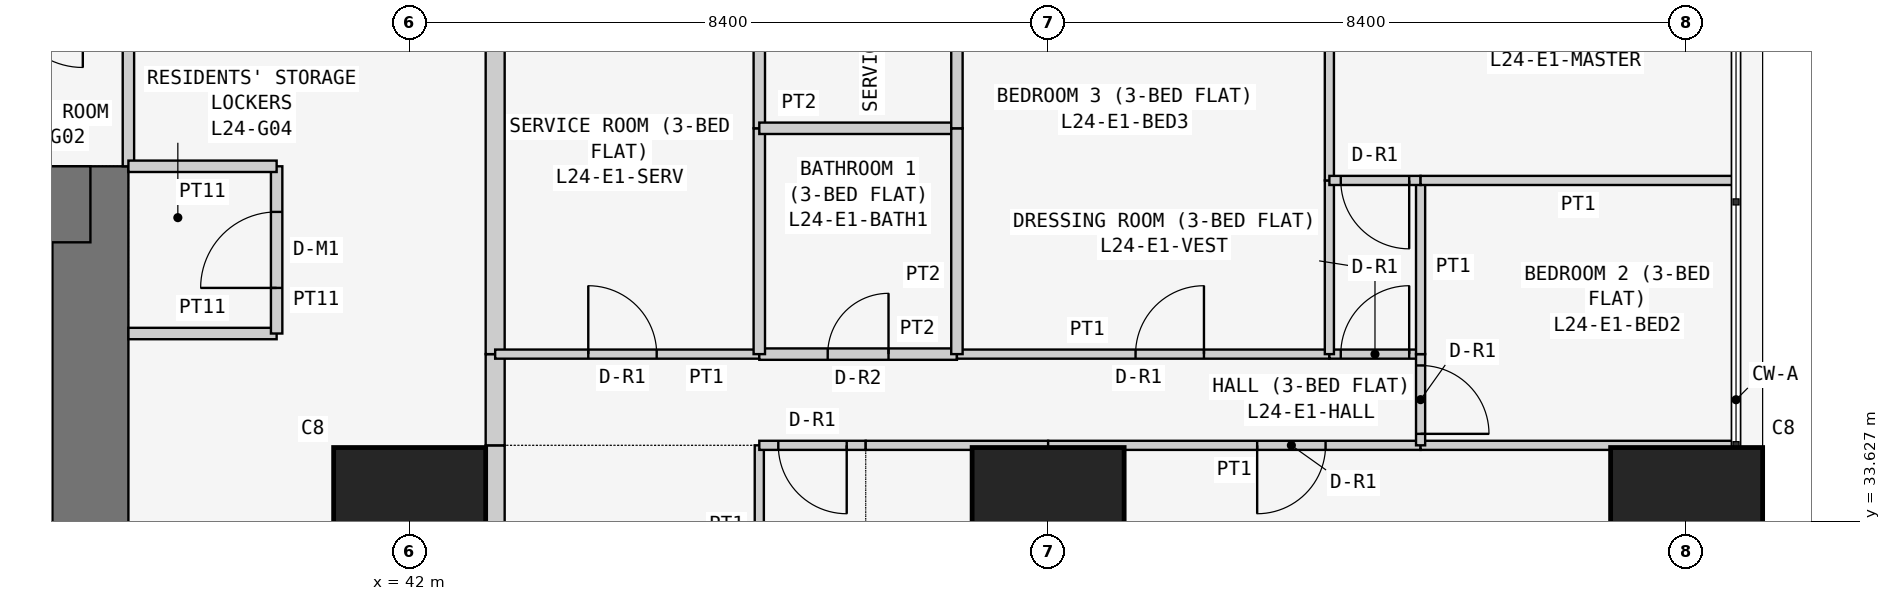
"""IFC4 building model, lengths in metres.
Left out: names, types, materials, properties, quantities, classifications, styles, units other than length and angle.
Written with IfcOpenShell. Run it as: python <this file> out.ifc"""

import sys

from ifc_helpers import new_model, si_unit, direction, frame, frame_2d, origin, origin_2d, place, context, subcontext, project, spatial, rectangle, extrude, element, fill, save


model = new_model("IFC4")
c1 = context("Model", 3, precision=1e-05, world=origin(), true_north=direction((0.0, 1.0)))
c2 = subcontext(c1, "Body", "Model", "MODEL_VIEW")
j1 = project(units=[si_unit("LENGTHUNIT", "METRE"), si_unit("PLANEANGLEUNIT", "RADIAN")], contexts=[c1])
p1 = place(None, origin())
s1 = spatial("IfcSite", under=j1, at=p1, CompositionType="ELEMENT")
p2 = place(p1, origin())
s2 = spatial("IfcBuilding", under=s1, at=p2, CompositionType="ELEMENT")
p3 = place(p2, frame((0.0, 0.0, 95.7)))
s3 = spatial("IfcBuildingStorey", under=s2, at=p3, CompositionType="ELEMENT", Elevation=95.7)
for number, where, z_axis, x_axis in (
    (1, (42.0, 33.6, 0.0), (0.0, 0.0, 1.0), (1.0, 0.0, 0.0)),
    (2, (50.4, 33.6, 0.0), (0.0, 0.0, 1.0), (1.0, 0.0, 0.0)),
    (3, (58.8, 33.6, 0.0), (0.0, 0.0, 1.0), (1.0, 0.0, 0.0)),
):
    element("IfcColumn", number, at=place(p3, frame(where, z_axis=z_axis, x_axis=x_axis)), inside=s3, PredefinedType="COLUMN", context=c2, shape_type="SweptSolid", body=[
        extrude(rectangle(XDim=2.0, YDim=2.0, at=origin_2d()), origin(), (0.0, 0.0, 1.0), 3.6),
    ])
p4 = place(p3, frame((37.8, 21.0, 0.0), z_axis=(0.0, 0.0, 1.0), x_axis=(0.0, 1.0, 0.0)))
e4 = element("IfcWall", 4, at=p4, inside=s3, PredefinedType="SHEAR", context=c2, shape_type="SweptSolid", body=[
    extrude(rectangle(XDim=17.3, YDim=1.0, at=frame_2d((8.65, 0.0))), origin(), (0.0, 0.0, 1.0), 3.6),
])
p5 = place(p4, frame((5.2, 0.0, 0.0)))
e5 = element("IfcOpeningElement", 5, at=p5, cuts=e4, PredefinedType="OPENING", context=c2, shape_type="SweptSolid", body=[
    extrude(rectangle(XDim=1.2, YDim=2.1, at=frame_2d((0.6, 1.05))), frame((0.0, 0.51, 0.0), z_axis=(0.0, -1.0, 0.0), x_axis=(1.0, 0.0, 0.0)), (0.0, 0.0, 1.0), 1.02),
])
p6 = place(p3, frame((37.8, 37.8, 0.0), z_axis=(0.0, 0.0, 1.0), x_axis=(-1.0, 0.0, 0.0)))
e6 = element("IfcWall", 6, at=p6, inside=s3, PredefinedType="SHEAR", context=c2, shape_type="SweptSolid", body=[
    extrude(rectangle(XDim=17.3, YDim=1.0, at=frame_2d((8.65, 0.0))), origin(), (0.0, 0.0, 1.0), 3.6),
])
p7 = place(p3, frame((38.3, 38.3, 0.0), z_axis=(0.0, 0.0, 1.0), x_axis=(0.0, 1.0, 0.0)))
e7 = element("IfcWall", 7, at=p7, inside=s3, PredefinedType="PARTITIONING", context=c2, shape_type="SweptSolid", body=[
    extrude(rectangle(XDim=2.3, YDim=0.15, at=frame_2d((1.15, 0.0))), origin(), (0.0, 0.0, 1.0), 3.45),
])
p8 = place(p3, frame((38.3, 36.1, 0.0), z_axis=(0.0, 0.0, 1.0), x_axis=(1.0, 0.0, 0.0)))
e8 = element("IfcWall", 8, at=p8, inside=s3, PredefinedType="PARTITIONING", context=c2, shape_type="SweptSolid", body=[
    extrude(rectangle(XDim=1.95, YDim=0.15, at=frame_2d((0.975, 0.0))), origin(), (0.0, 0.0, 1.0), 3.45),
])
p9 = place(p3, frame((40.25, 36.1, 0.0), z_axis=(0.0, 0.0, 1.0), x_axis=(0.0, 1.0, 0.0)))
e9 = element("IfcWall", 9, at=p9, inside=s3, PredefinedType="PARTITIONING", context=c2, shape_type="SweptSolid", body=[
    extrude(rectangle(XDim=2.2, YDim=0.15, at=frame_2d((1.1, 0.0))), origin(), (0.0, 0.0, 1.0), 3.45),
])
p10 = place(p9, frame((0.6, 0.0, 0.0)))
e10 = element("IfcOpeningElement", 10, at=p10, cuts=e9, PredefinedType="OPENING", context=c2, shape_type="SweptSolid", body=[
    extrude(rectangle(XDim=1.0, YDim=2.1, at=frame_2d((0.5, 1.05))), frame((0.0, 0.085, 0.0), z_axis=(0.0, -1.0, 0.0), x_axis=(1.0, 0.0, 0.0)), (0.0, 0.0, 1.0), 0.17),
])
p11 = place(p3, frame((40.25, 38.3, 0.0), z_axis=(0.0, 0.0, 1.0), x_axis=(-1.0, 0.0, 0.0)))
e11 = element("IfcWall", 11, at=p11, inside=s3, PredefinedType="PARTITIONING", context=c2, shape_type="SweptSolid", body=[
    extrude(rectangle(XDim=1.95, YDim=0.15, at=frame_2d((0.975, 0.0))), origin(), (0.0, 0.0, 1.0), 3.45),
])
p12 = place(p3, frame((43.125, 34.629, 0.0), z_axis=(0.0, 0.0, 1.0), x_axis=(0.0, -1.0, 0.0)))
e12 = element("IfcWall", 12, at=p12, inside=s3, PredefinedType="PARTITIONING", context=c2, shape_type="SweptSolid", body=[
    extrude(rectangle(XDim=5.229, YDim=0.25, at=frame_2d((2.615, 0.0))), origin(), (0.0, 0.0, 1.0), 3.45),
])
p13 = place(p12, frame((2.229, 0.0, 0.0)))
e13 = element("IfcOpeningElement", 13, at=p13, cuts=e12, PredefinedType="OPENING", context=c2, shape_type="SweptSolid", body=[
    extrude(rectangle(XDim=1.0, YDim=2.1, at=frame_2d((0.5, 1.05))), frame((0.0, 0.135, 0.0), z_axis=(0.0, -1.0, 0.0), x_axis=(1.0, 0.0, 0.0)), (0.0, 0.0, 1.0), 0.27),
])
p14 = place(p3, frame((43.125, 35.829, 0.0), z_axis=(0.0, 0.0, 1.0), x_axis=(0.0, -1.0, 0.0)))
e14 = element("IfcWall", 14, at=p14, inside=s3, PredefinedType="PARTITIONING", context=c2, shape_type="SweptSolid", body=[
    extrude(rectangle(XDim=1.2, YDim=0.25, at=frame_2d((0.6, 0.0))), origin(), (0.0, 0.0, 1.0), 3.45),
])
p15 = place(p3, frame((43.125, 42.7, 0.0), z_axis=(0.0, 0.0, 1.0), x_axis=(0.0, -1.0, 0.0)))
e15 = element("IfcWall", 15, at=p15, inside=s3, PredefinedType="PARTITIONING", context=c2, shape_type="SweptSolid", body=[
    extrude(rectangle(XDim=6.871, YDim=0.25, at=frame_2d((3.436, 0.0))), origin(), (0.0, 0.0, 1.0), 3.45),
])
p16 = place(p3, frame((46.6, 29.4, 0.0), z_axis=(0.0, 0.0, 1.0), x_axis=(0.0, 1.0, 0.0)))
e16 = element("IfcWall", 16, at=p16, inside=s3, PredefinedType="PARTITIONING", context=c2, shape_type="SweptSolid", body=[
    extrude(rectangle(XDim=5.229, YDim=0.12, at=frame_2d((2.615, 0.0))), origin(), (0.0, 0.0, 1.0), 3.45),
])
p17 = place(p3, frame((48.0, 34.629, 0.0), z_axis=(0.0, 0.0, 1.0), x_axis=(-1.0, 0.0, 0.0)))
e17 = element("IfcWall", 17, at=p17, inside=s3, PredefinedType="PARTITIONING", context=c2, shape_type="SweptSolid", body=[
    extrude(rectangle(XDim=1.4, YDim=0.12, at=frame_2d((0.7, 0.0))), origin(), (0.0, 0.0, 1.0), 3.45),
])
p18 = place(p17, frame((0.25, 0.0, 0.0)))
e18 = element("IfcOpeningElement", 18, at=p18, cuts=e17, PredefinedType="OPENING", context=c2, shape_type="SweptSolid", body=[
    extrude(rectangle(XDim=0.9, YDim=2.1, at=frame_2d((0.45, 1.05))), frame((0.0, 0.07, 0.0), z_axis=(0.0, -1.0, 0.0), x_axis=(1.0, 0.0, 0.0)), (0.0, 0.0, 1.0), 0.14),
])
p19 = place(p3, frame((50.4, 34.629, 0.0), z_axis=(0.0, 0.0, 1.0), x_axis=(-1.0, 0.0, 0.0)))
e19 = element("IfcWall", 19, at=p19, inside=s3, PredefinedType="PARTITIONING", context=c2, shape_type="SweptSolid", body=[
    extrude(rectangle(XDim=2.4, YDim=0.12, at=frame_2d((1.2, 0.0))), origin(), (0.0, 0.0, 1.0), 3.45),
])
p20 = place(p3, frame((55.3, 34.629, 0.0), z_axis=(0.0, 0.0, 1.0), x_axis=(-1.0, 0.0, 0.0)))
e20 = element("IfcWall", 20, at=p20, inside=s3, PredefinedType="PARTITIONING", context=c2, shape_type="SweptSolid", body=[
    extrude(rectangle(XDim=4.9, YDim=0.12, at=frame_2d((2.45, 0.0))), origin(), (0.0, 0.0, 1.0), 3.45),
])
p21 = place(p20, frame((1.25, 0.0, 0.0)))
e21 = element("IfcOpeningElement", 21, at=p21, cuts=e20, PredefinedType="OPENING", context=c2, shape_type="SweptSolid", body=[
    extrude(rectangle(XDim=0.9, YDim=2.1, at=frame_2d((0.45, 1.05))), frame((0.0, 0.07, 0.0), z_axis=(0.0, -1.0, 0.0), x_axis=(1.0, 0.0, 0.0)), (0.0, 0.0, 1.0), 0.14),
])
p22 = place(p3, frame((59.45, 34.629, 0.0), z_axis=(0.0, 0.0, 1.0), x_axis=(-1.0, 0.0, 0.0)))
e22 = element("IfcWall", 22, at=p22, inside=s3, PredefinedType="PARTITIONING", context=c2, shape_type="SweptSolid", body=[
    extrude(rectangle(XDim=4.15, YDim=0.12, at=frame_2d((2.075, 0.0))), origin(), (0.0, 0.0, 1.0), 3.45),
])
p23 = place(p3, frame((46.6, 35.829, 0.0), z_axis=(0.0, 0.0, 1.0), x_axis=(-1.0, 0.0, 0.0)))
e23 = element("IfcWall", 23, at=p23, inside=s3, PredefinedType="PARTITIONING", context=c2, shape_type="SweptSolid", body=[
    extrude(rectangle(XDim=3.475, YDim=0.12, at=frame_2d((1.738, 0.0))), origin(), (0.0, 0.0, 1.0), 3.45),
])
p24 = place(p23, frame((1.35, 0.0, 0.0)))
e24 = element("IfcOpeningElement", 24, at=p24, cuts=e23, PredefinedType="OPENING", context=c2, shape_type="SweptSolid", body=[
    extrude(rectangle(XDim=0.9, YDim=2.1, at=frame_2d((0.45, 1.05))), frame((0.0, 0.07, 0.0), z_axis=(0.0, -1.0, 0.0), x_axis=(1.0, 0.0, 0.0)), (0.0, 0.0, 1.0), 0.14),
])
p25 = place(p3, frame((49.2, 35.829, 0.0), z_axis=(0.0, 0.0, 1.0), x_axis=(-1.0, 0.0, 0.0)))
e25 = element("IfcWall", 25, at=p25, inside=s3, PredefinedType="PARTITIONING", context=c2, shape_type="SweptSolid", body=[
    extrude(rectangle(XDim=2.6, YDim=0.15, at=frame_2d((1.3, 0.0))), origin(), (0.0, 0.0, 1.0), 3.45),
])
p26 = place(p25, frame((0.9, 0.0, 0.0)))
e26 = element("IfcOpeningElement", 26, at=p26, cuts=e25, PredefinedType="OPENING", context=c2, shape_type="SweptSolid", body=[
    extrude(rectangle(XDim=0.8, YDim=2.1, at=frame_2d((0.4, 1.05))), frame((0.0, 0.085, 0.0), z_axis=(0.0, -1.0, 0.0), x_axis=(1.0, 0.0, 0.0)), (0.0, 0.0, 1.0), 0.17),
])
p27 = place(p3, frame((54.1, 35.829, 0.0), z_axis=(0.0, 0.0, 1.0), x_axis=(-1.0, 0.0, 0.0)))
e27 = element("IfcWall", 27, at=p27, inside=s3, PredefinedType="PARTITIONING", context=c2, shape_type="SweptSolid", body=[
    extrude(rectangle(XDim=4.9, YDim=0.12, at=frame_2d((2.45, 0.0))), origin(), (0.0, 0.0, 1.0), 3.45),
])
p28 = place(p27, frame((1.65, 0.0, 0.0)))
e28 = element("IfcOpeningElement", 28, at=p28, cuts=e27, PredefinedType="OPENING", context=c2, shape_type="SweptSolid", body=[
    extrude(rectangle(XDim=0.9, YDim=2.1, at=frame_2d((0.45, 1.05))), frame((0.0, 0.07, 0.0), z_axis=(0.0, -1.0, 0.0), x_axis=(1.0, 0.0, 0.0)), (0.0, 0.0, 1.0), 0.14),
])
p29 = place(p3, frame((55.3, 35.829, 0.0), z_axis=(0.0, 0.0, 1.0), x_axis=(-1.0, 0.0, 0.0)))
e29 = element("IfcWall", 29, at=p29, inside=s3, PredefinedType="PARTITIONING", context=c2, shape_type="SweptSolid", body=[
    extrude(rectangle(XDim=1.2, YDim=0.12, at=frame_2d((0.6, 0.0))), origin(), (0.0, 0.0, 1.0), 3.45),
])
p30 = place(p29, frame((0.15, 0.0, 0.0)))
e30 = element("IfcOpeningElement", 30, at=p30, cuts=e29, PredefinedType="OPENING", context=c2, shape_type="SweptSolid", body=[
    extrude(rectangle(XDim=0.9, YDim=2.1, at=frame_2d((0.45, 1.05))), frame((0.0, 0.07, 0.0), z_axis=(0.0, -1.0, 0.0), x_axis=(1.0, 0.0, 0.0)), (0.0, 0.0, 1.0), 0.14),
])
p31 = place(p3, frame((55.3, 34.629, 0.0), z_axis=(0.0, 0.0, 1.0), x_axis=(0.0, 1.0, 0.0)))
e31 = element("IfcWall", 31, at=p31, inside=s3, PredefinedType="PARTITIONING", context=c2, shape_type="SweptSolid", body=[
    extrude(rectangle(XDim=1.2, YDim=0.12, at=frame_2d((0.6, 0.0))), origin(), (0.0, 0.0, 1.0), 3.45),
])
p32 = place(p31, frame((0.151, 0.0, 0.0)))
e32 = element("IfcOpeningElement", 32, at=p32, cuts=e31, PredefinedType="OPENING", context=c2, shape_type="SweptSolid", body=[
    extrude(rectangle(XDim=0.9, YDim=2.1, at=frame_2d((0.45, 1.05))), frame((0.0, 0.07, 0.0), z_axis=(0.0, -1.0, 0.0), x_axis=(1.0, 0.0, 0.0)), (0.0, 0.0, 1.0), 0.14),
])
p33 = place(p3, frame((46.6, 35.829, 0.0), z_axis=(0.0, 0.0, 1.0), x_axis=(0.0, 1.0, 0.0)))
e33 = element("IfcWall", 33, at=p33, inside=s3, PredefinedType="PARTITIONING", context=c2, shape_type="SweptSolid", body=[
    extrude(rectangle(XDim=2.971, YDim=0.15, at=frame_2d((1.485, 0.0))), origin(), (0.0, 0.0, 1.0), 3.45),
])
p34 = place(p3, frame((46.6, 38.8, 0.0), z_axis=(0.0, 0.0, 1.0), x_axis=(0.0, 1.0, 0.0)))
e34 = element("IfcWall", 34, at=p34, inside=s3, PredefinedType="PARTITIONING", context=c2, shape_type="SweptSolid", body=[
    extrude(rectangle(XDim=3.9, YDim=0.15, at=frame_2d((1.95, 0.0))), origin(), (0.0, 0.0, 1.0), 3.45),
])
p35 = place(p34, frame((1.25, 0.0, 0.0)))
e35 = element("IfcOpeningElement", 35, at=p35, cuts=e34, PredefinedType="OPENING", context=c2, shape_type="SweptSolid", body=[
    extrude(rectangle(XDim=0.8, YDim=2.1, at=frame_2d((0.4, 1.05))), frame((0.0, 0.085, 0.0), z_axis=(0.0, -1.0, 0.0), x_axis=(1.0, 0.0, 0.0)), (0.0, 0.0, 1.0), 0.17),
])
p36 = place(p3, frame((49.2, 38.8, 0.0), z_axis=(0.0, 0.0, 1.0), x_axis=(-1.0, 0.0, 0.0)))
e36 = element("IfcWall", 36, at=p36, inside=s3, PredefinedType="PARTITIONING", context=c2, shape_type="SweptSolid", body=[
    extrude(rectangle(XDim=2.6, YDim=0.15, at=frame_2d((1.3, 0.0))), origin(), (0.0, 0.0, 1.0), 3.45),
])
p37 = place(p3, frame((49.2, 35.829, 0.0), z_axis=(0.0, 0.0, 1.0), x_axis=(0.0, 1.0, 0.0)))
e37 = element("IfcWall", 37, at=p37, inside=s3, PredefinedType="PARTITIONING", context=c2, shape_type="SweptSolid", body=[
    extrude(rectangle(XDim=2.971, YDim=0.15, at=frame_2d((1.485, 0.0))), origin(), (0.0, 0.0, 1.0), 3.45),
])
p38 = place(p3, frame((49.2, 38.8, 0.0), z_axis=(0.0, 0.0, 1.0), x_axis=(0.0, 1.0, 0.0)))
e38 = element("IfcWall", 38, at=p38, inside=s3, PredefinedType="PARTITIONING", context=c2, shape_type="SweptSolid", body=[
    extrude(rectangle(XDim=3.9, YDim=0.15, at=frame_2d((1.95, 0.0))), origin(), (0.0, 0.0, 1.0), 3.45),
])
p39 = place(p3, frame((54.1, 35.829, 0.0), z_axis=(0.0, 0.0, 1.0), x_axis=(0.0, 1.0, 0.0)))
e39 = element("IfcWall", 39, at=p39, inside=s3, PredefinedType="PARTITIONING", context=c2, shape_type="SweptSolid", body=[
    extrude(rectangle(XDim=2.285, YDim=0.12, at=frame_2d((1.143, 0.0))), origin(), (0.0, 0.0, 1.0), 3.45),
])
p40 = place(p3, frame((54.1, 38.114, 0.0), z_axis=(0.0, 0.0, 1.0), x_axis=(0.0, 1.0, 0.0)))
e40 = element("IfcWall", 40, at=p40, inside=s3, PredefinedType="PARTITIONING", context=c2, shape_type="SweptSolid", body=[
    extrude(rectangle(XDim=4.586, YDim=0.12, at=frame_2d((2.293, 0.0))), origin(), (0.0, 0.0, 1.0), 3.45),
])
p41 = place(p3, frame((55.3, 35.829, 0.0), z_axis=(0.0, 0.0, 1.0), x_axis=(0.0, 1.0, 0.0)))
e41 = element("IfcWall", 41, at=p41, inside=s3, PredefinedType="PARTITIONING", context=c2, shape_type="SweptSolid", body=[
    extrude(rectangle(XDim=2.285, YDim=0.12, at=frame_2d((1.143, 0.0))), origin(), (0.0, 0.0, 1.0), 3.45),
])
p42 = place(p3, frame((55.3, 38.114, 0.0), z_axis=(0.0, 0.0, 1.0), x_axis=(-1.0, 0.0, 0.0)))
e42 = element("IfcWall", 42, at=p42, inside=s3, PredefinedType="PARTITIONING", context=c2, shape_type="SweptSolid", body=[
    extrude(rectangle(XDim=1.2, YDim=0.12, at=frame_2d((0.6, 0.0))), origin(), (0.0, 0.0, 1.0), 3.45),
])
p43 = place(p42, frame((0.15, 0.0, 0.0)))
e43 = element("IfcOpeningElement", 43, at=p43, cuts=e42, PredefinedType="OPENING", context=c2, shape_type="SweptSolid", body=[
    extrude(rectangle(XDim=0.9, YDim=2.1, at=frame_2d((0.45, 1.05))), frame((0.0, 0.07, 0.0), z_axis=(0.0, -1.0, 0.0), x_axis=(1.0, 0.0, 0.0)), (0.0, 0.0, 1.0), 0.14),
])
p44 = place(p3, frame((59.45, 38.114, 0.0), z_axis=(0.0, 0.0, 1.0), x_axis=(-1.0, 0.0, 0.0)))
e44 = element("IfcWall", 44, at=p44, inside=s3, PredefinedType="PARTITIONING", context=c2, shape_type="SweptSolid", body=[
    extrude(rectangle(XDim=4.15, YDim=0.12, at=frame_2d((2.075, 0.0))), origin(), (0.0, 0.0, 1.0), 3.45),
])
p45 = place(p10, origin())
e45 = element("IfcDoor", 45, at=p45, inside=s3, OperationType="SINGLE_SWING_LEFT", PredefinedType="DOOR", context=c2, shape_type="SweptSolid", body=[
    extrude(rectangle(XDim=1.0, YDim=2.1, at=frame_2d((0.5, 1.05))), frame((0.0, 0.025, 0.0), z_axis=(0.0, -1.0, 0.0), x_axis=(1.0, 0.0, 0.0)), (0.0, 0.0, 1.0), 0.05),
])
fill(e10, e45)
p46 = place(p18, origin())
e46 = element("IfcDoor", 46, at=p46, inside=s3, OperationType="SINGLE_SWING_LEFT", PredefinedType="DOOR", context=c2, shape_type="SweptSolid", body=[
    extrude(rectangle(XDim=0.9, YDim=2.1, at=frame_2d((0.45, 1.05))), frame((0.0, 0.025, 0.0), z_axis=(0.0, -1.0, 0.0), x_axis=(1.0, 0.0, 0.0)), (0.0, 0.0, 1.0), 0.05),
])
fill(e18, e46)
p47 = place(p21, origin())
e47 = element("IfcDoor", 47, at=p47, inside=s3, OperationType="SINGLE_SWING_RIGHT", PredefinedType="DOOR", context=c2, shape_type="SweptSolid", body=[
    extrude(rectangle(XDim=0.9, YDim=2.1, at=frame_2d((0.45, 1.05))), frame((0.0, 0.025, 0.0), z_axis=(0.0, -1.0, 0.0), x_axis=(1.0, 0.0, 0.0)), (0.0, 0.0, 1.0), 0.05),
])
fill(e21, e47)
p48 = place(p24, frame((0.9, 0.0, 0.0), z_axis=(0.0, 0.0, 1.0), x_axis=(-1.0, 0.0, 0.0)))
e48 = element("IfcDoor", 48, at=p48, inside=s3, OperationType="SINGLE_SWING_LEFT", PredefinedType="DOOR", context=c2, shape_type="SweptSolid", body=[
    extrude(rectangle(XDim=0.9, YDim=2.1, at=frame_2d((0.45, 1.05))), frame((0.0, 0.025, 0.0), z_axis=(0.0, -1.0, 0.0), x_axis=(1.0, 0.0, 0.0)), (0.0, 0.0, 1.0), 0.05),
])
fill(e24, e48)
p49 = place(p26, frame((0.8, 0.0, 0.0), z_axis=(0.0, 0.0, 1.0), x_axis=(-1.0, 0.0, 0.0)))
e49 = element("IfcDoor", 49, at=p49, inside=s3, OperationType="SINGLE_SWING_RIGHT", PredefinedType="DOOR", context=c2, shape_type="SweptSolid", body=[
    extrude(rectangle(XDim=0.8, YDim=2.1, at=frame_2d((0.4, 1.05))), frame((0.0, 0.025, 0.0), z_axis=(0.0, -1.0, 0.0), x_axis=(1.0, 0.0, 0.0)), (0.0, 0.0, 1.0), 0.05),
])
fill(e26, e49)
p50 = place(p28, frame((0.9, 0.0, 0.0), z_axis=(0.0, 0.0, 1.0), x_axis=(-1.0, 0.0, 0.0)))
e50 = element("IfcDoor", 50, at=p50, inside=s3, OperationType="SINGLE_SWING_RIGHT", PredefinedType="DOOR", context=c2, shape_type="SweptSolid", body=[
    extrude(rectangle(XDim=0.9, YDim=2.1, at=frame_2d((0.45, 1.05))), frame((0.0, 0.025, 0.0), z_axis=(0.0, -1.0, 0.0), x_axis=(1.0, 0.0, 0.0)), (0.0, 0.0, 1.0), 0.05),
])
fill(e28, e50)
p51 = place(p30, frame((0.9, 0.0, 0.0), z_axis=(0.0, 0.0, 1.0), x_axis=(-1.0, 0.0, 0.0)))
e51 = element("IfcDoor", 51, at=p51, inside=s3, OperationType="SINGLE_SWING_RIGHT", PredefinedType="DOOR", context=c2, shape_type="SweptSolid", body=[
    extrude(rectangle(XDim=0.9, YDim=2.1, at=frame_2d((0.45, 1.05))), frame((0.0, 0.025, 0.0), z_axis=(0.0, -1.0, 0.0), x_axis=(1.0, 0.0, 0.0)), (0.0, 0.0, 1.0), 0.05),
])
fill(e30, e51)
p52 = place(p43, origin())
e52 = element("IfcDoor", 52, at=p52, inside=s3, OperationType="SINGLE_SWING_LEFT", PredefinedType="DOOR", context=c2, shape_type="SweptSolid", body=[
    extrude(rectangle(XDim=0.9, YDim=2.1, at=frame_2d((0.45, 1.05))), frame((0.0, 0.025, 0.0), z_axis=(0.0, -1.0, 0.0), x_axis=(1.0, 0.0, 0.0)), (0.0, 0.0, 1.0), 0.05),
])
fill(e43, e52)
p53 = place(p32, frame((0.9, 0.0, 0.0), z_axis=(0.0, 0.0, 1.0), x_axis=(-1.0, 0.0, 0.0)))
e53 = element("IfcDoor", 53, at=p53, inside=s3, OperationType="SINGLE_SWING_RIGHT", PredefinedType="DOOR", context=c2, shape_type="SweptSolid", body=[
    extrude(rectangle(XDim=0.9, YDim=2.1, at=frame_2d((0.45, 1.05))), frame((0.0, 0.025, 0.0), z_axis=(0.0, -1.0, 0.0), x_axis=(1.0, 0.0, 0.0)), (0.0, 0.0, 1.0), 0.05),
])
fill(e32, e53)
save(model, sys.argv[1])
